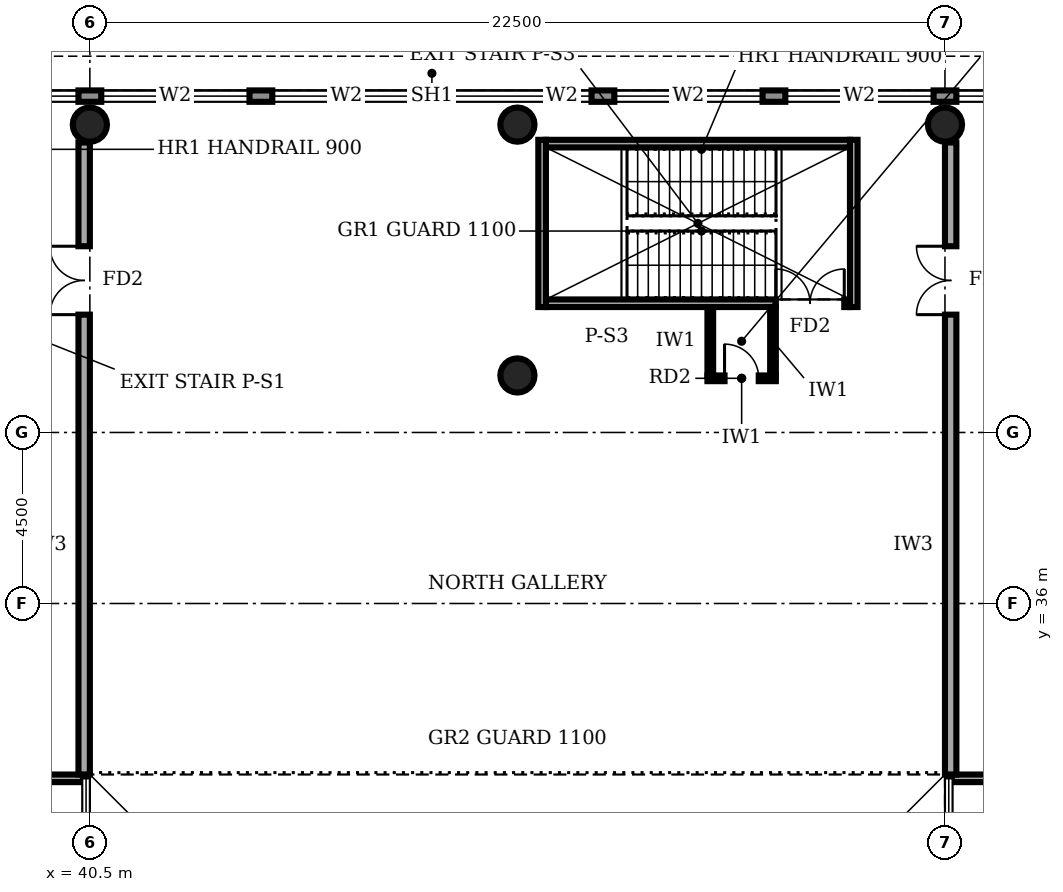
"""IFC4 building model, lengths in metres.
Left out: names, types, materials, properties, quantities, classifications, styles, units other than length and angle.
Written with IfcOpenShell. Run it as: python <this file> out.ifc"""

import sys

from ifc_helpers import new_model, si_unit, direction, frame, frame_2d, origin, origin_2d, place, context, subcontext, project, spatial, rectangle, circle, extrude, element, fill, save


model = new_model("IFC4")
c1 = context("Model", 3, precision=1e-05, world=origin(), true_north=direction((0.0, 1.0)))
c2 = subcontext(c1, "Body", "Model", "MODEL_VIEW")
j1 = project(units=[si_unit("LENGTHUNIT", "METRE"), si_unit("PLANEANGLEUNIT", "RADIAN")], contexts=[c1])
p1 = place(None, origin())
s1 = spatial("IfcSite", under=j1, at=p1, CompositionType="ELEMENT")
p2 = place(p1, origin())
s2 = spatial("IfcBuilding", under=s1, at=p2, CompositionType="ELEMENT")
p3 = place(p2, frame((0.0, 0.0, 6.0)))
s3 = spatial("IfcBuildingStorey", under=s2, at=p3, CompositionType="ELEMENT", Elevation=6.0)
for number, where, z_axis, x_axis in (
    (1, (51.75, 42.0, 0.0), (0.0, 0.0, 1.0), (1.0, 0.0, 0.0)),
    (2, (40.5, 48.6, 0.0), (0.0, 0.0, 1.0), (1.0, 0.0, 0.0)),
    (3, (51.75, 48.6, 0.0), (0.0, 0.0, 1.0), (1.0, 0.0, 0.0)),
    (4, (63.0, 48.6, 0.0), (0.0, 0.0, 1.0), (1.0, 0.0, 0.0)),
):
    element("IfcColumn", number, at=place(p3, frame(where, z_axis=z_axis, x_axis=x_axis)), inside=s3, PredefinedType="COLUMN", context=c2, shape_type="SweptSolid", body=[
        extrude(circle(Radius=0.45, at=origin_2d()), origin(), (0.0, 0.0, 1.0), 5.0),
    ])
p4 = place(p3, frame((98.98, 49.35, 0.0), z_axis=(0.0, 0.0, 1.0), x_axis=(-1.0, 0.0, 0.0)))
e5 = element("IfcWall", 5, at=p4, inside=s3, PredefinedType="STANDARD", context=c2, shape_type="SweptSolid", body=[
    extrude(rectangle(XDim=98.96, YDim=0.3, at=frame_2d((49.48, 0.0))), origin(), (0.0, 0.0, 1.0), 4.7),
])
p5 = place(p4, frame((94.78, 0.0, 0.6)))
e6 = element("IfcOpeningElement", 6, at=p5, cuts=e5, PredefinedType="OPENING", context=c2, shape_type="SweptSolid", body=[
    extrude(rectangle(XDim=3.9, YDim=2.6, at=frame_2d((1.95, 1.3))), frame((0.0, 0.16, 0.0), z_axis=(0.0, -1.0, 0.0), x_axis=(1.0, 0.0, 0.0)), (0.0, 0.0, 1.0), 0.32),
])
p6 = place(p4, frame((90.28, 0.0, 0.6)))
e7 = element("IfcOpeningElement", 7, at=p6, cuts=e5, PredefinedType="OPENING", context=c2, shape_type="SweptSolid", body=[
    extrude(rectangle(XDim=3.9, YDim=2.6, at=frame_2d((1.95, 1.3))), frame((0.0, 0.16, 0.0), z_axis=(0.0, -1.0, 0.0), x_axis=(1.0, 0.0, 0.0)), (0.0, 0.0, 1.0), 0.32),
])
p7 = place(p4, frame((85.78, 0.0, 0.6)))
e8 = element("IfcOpeningElement", 8, at=p7, cuts=e5, PredefinedType="OPENING", context=c2, shape_type="SweptSolid", body=[
    extrude(rectangle(XDim=3.9, YDim=2.6, at=frame_2d((1.95, 1.3))), frame((0.0, 0.16, 0.0), z_axis=(0.0, -1.0, 0.0), x_axis=(1.0, 0.0, 0.0)), (0.0, 0.0, 1.0), 0.32),
])
p8 = place(p4, frame((81.28, 0.0, 0.6)))
e9 = element("IfcOpeningElement", 9, at=p8, cuts=e5, PredefinedType="OPENING", context=c2, shape_type="SweptSolid", body=[
    extrude(rectangle(XDim=3.9, YDim=2.6, at=frame_2d((1.95, 1.3))), frame((0.0, 0.16, 0.0), z_axis=(0.0, -1.0, 0.0), x_axis=(1.0, 0.0, 0.0)), (0.0, 0.0, 1.0), 0.32),
])
p9 = place(p4, frame((76.78, 0.0, 0.6)))
e10 = element("IfcOpeningElement", 10, at=p9, cuts=e5, PredefinedType="OPENING", context=c2, shape_type="SweptSolid", body=[
    extrude(rectangle(XDim=3.9, YDim=2.6, at=frame_2d((1.95, 1.3))), frame((0.0, 0.16, 0.0), z_axis=(0.0, -1.0, 0.0), x_axis=(1.0, 0.0, 0.0)), (0.0, 0.0, 1.0), 0.32),
])
p10 = place(p4, frame((72.28, 0.0, 0.6)))
e11 = element("IfcOpeningElement", 11, at=p10, cuts=e5, PredefinedType="OPENING", context=c2, shape_type="SweptSolid", body=[
    extrude(rectangle(XDim=3.9, YDim=2.6, at=frame_2d((1.95, 1.3))), frame((0.0, 0.16, 0.0), z_axis=(0.0, -1.0, 0.0), x_axis=(1.0, 0.0, 0.0)), (0.0, 0.0, 1.0), 0.32),
])
p11 = place(p4, frame((67.78, 0.0, 0.6)))
e12 = element("IfcOpeningElement", 12, at=p11, cuts=e5, PredefinedType="OPENING", context=c2, shape_type="SweptSolid", body=[
    extrude(rectangle(XDim=3.9, YDim=2.6, at=frame_2d((1.95, 1.3))), frame((0.0, 0.16, 0.0), z_axis=(0.0, -1.0, 0.0), x_axis=(1.0, 0.0, 0.0)), (0.0, 0.0, 1.0), 0.32),
])
p12 = place(p4, frame((63.28, 0.0, 0.6)))
e13 = element("IfcOpeningElement", 13, at=p12, cuts=e5, PredefinedType="OPENING", context=c2, shape_type="SweptSolid", body=[
    extrude(rectangle(XDim=3.9, YDim=2.6, at=frame_2d((1.95, 1.3))), frame((0.0, 0.16, 0.0), z_axis=(0.0, -1.0, 0.0), x_axis=(1.0, 0.0, 0.0)), (0.0, 0.0, 1.0), 0.32),
])
p13 = place(p4, frame((58.78, 0.0, 0.6)))
e14 = element("IfcOpeningElement", 14, at=p13, cuts=e5, PredefinedType="OPENING", context=c2, shape_type="SweptSolid", body=[
    extrude(rectangle(XDim=3.9, YDim=2.6, at=frame_2d((1.95, 1.3))), frame((0.0, 0.16, 0.0), z_axis=(0.0, -1.0, 0.0), x_axis=(1.0, 0.0, 0.0)), (0.0, 0.0, 1.0), 0.32),
])
p14 = place(p4, frame((54.28, 0.0, 0.6)))
e15 = element("IfcOpeningElement", 15, at=p14, cuts=e5, PredefinedType="OPENING", context=c2, shape_type="SweptSolid", body=[
    extrude(rectangle(XDim=3.9, YDim=2.6, at=frame_2d((1.95, 1.3))), frame((0.0, 0.16, 0.0), z_axis=(0.0, -1.0, 0.0), x_axis=(1.0, 0.0, 0.0)), (0.0, 0.0, 1.0), 0.32),
])
p15 = place(p4, frame((49.78, 0.0, 0.6)))
e16 = element("IfcOpeningElement", 16, at=p15, cuts=e5, PredefinedType="OPENING", context=c2, shape_type="SweptSolid", body=[
    extrude(rectangle(XDim=3.9, YDim=2.6, at=frame_2d((1.95, 1.3))), frame((0.0, 0.16, 0.0), z_axis=(0.0, -1.0, 0.0), x_axis=(1.0, 0.0, 0.0)), (0.0, 0.0, 1.0), 0.32),
])
p16 = place(p4, frame((45.28, 0.0, 0.6)))
e17 = element("IfcOpeningElement", 17, at=p16, cuts=e5, PredefinedType="OPENING", context=c2, shape_type="SweptSolid", body=[
    extrude(rectangle(XDim=3.9, YDim=2.6, at=frame_2d((1.95, 1.3))), frame((0.0, 0.16, 0.0), z_axis=(0.0, -1.0, 0.0), x_axis=(1.0, 0.0, 0.0)), (0.0, 0.0, 1.0), 0.32),
])
p17 = place(p4, frame((40.78, 0.0, 0.6)))
e18 = element("IfcOpeningElement", 18, at=p17, cuts=e5, PredefinedType="OPENING", context=c2, shape_type="SweptSolid", body=[
    extrude(rectangle(XDim=3.9, YDim=2.6, at=frame_2d((1.95, 1.3))), frame((0.0, 0.16, 0.0), z_axis=(0.0, -1.0, 0.0), x_axis=(1.0, 0.0, 0.0)), (0.0, 0.0, 1.0), 0.32),
])
p18 = place(p4, frame((36.28, 0.0, 0.6)))
e19 = element("IfcOpeningElement", 19, at=p18, cuts=e5, PredefinedType="OPENING", context=c2, shape_type="SweptSolid", body=[
    extrude(rectangle(XDim=3.9, YDim=2.6, at=frame_2d((1.95, 1.3))), frame((0.0, 0.16, 0.0), z_axis=(0.0, -1.0, 0.0), x_axis=(1.0, 0.0, 0.0)), (0.0, 0.0, 1.0), 0.32),
])
p19 = place(p4, frame((31.78, 0.0, 0.6)))
e20 = element("IfcOpeningElement", 20, at=p19, cuts=e5, PredefinedType="OPENING", context=c2, shape_type="SweptSolid", body=[
    extrude(rectangle(XDim=3.9, YDim=2.6, at=frame_2d((1.95, 1.3))), frame((0.0, 0.16, 0.0), z_axis=(0.0, -1.0, 0.0), x_axis=(1.0, 0.0, 0.0)), (0.0, 0.0, 1.0), 0.32),
])
p20 = place(p4, frame((27.28, 0.0, 0.6)))
e21 = element("IfcOpeningElement", 21, at=p20, cuts=e5, PredefinedType="OPENING", context=c2, shape_type="SweptSolid", body=[
    extrude(rectangle(XDim=3.9, YDim=2.6, at=frame_2d((1.95, 1.3))), frame((0.0, 0.16, 0.0), z_axis=(0.0, -1.0, 0.0), x_axis=(1.0, 0.0, 0.0)), (0.0, 0.0, 1.0), 0.32),
])
p21 = place(p4, frame((22.78, 0.0, 0.6)))
e22 = element("IfcOpeningElement", 22, at=p21, cuts=e5, PredefinedType="OPENING", context=c2, shape_type="SweptSolid", body=[
    extrude(rectangle(XDim=3.9, YDim=2.6, at=frame_2d((1.95, 1.3))), frame((0.0, 0.16, 0.0), z_axis=(0.0, -1.0, 0.0), x_axis=(1.0, 0.0, 0.0)), (0.0, 0.0, 1.0), 0.32),
])
p22 = place(p4, frame((18.28, 0.0, 0.6)))
e23 = element("IfcOpeningElement", 23, at=p22, cuts=e5, PredefinedType="OPENING", context=c2, shape_type="SweptSolid", body=[
    extrude(rectangle(XDim=3.9, YDim=2.6, at=frame_2d((1.95, 1.3))), frame((0.0, 0.16, 0.0), z_axis=(0.0, -1.0, 0.0), x_axis=(1.0, 0.0, 0.0)), (0.0, 0.0, 1.0), 0.32),
])
p23 = place(p4, frame((13.78, 0.0, 0.6)))
e24 = element("IfcOpeningElement", 24, at=p23, cuts=e5, PredefinedType="OPENING", context=c2, shape_type="SweptSolid", body=[
    extrude(rectangle(XDim=3.9, YDim=2.6, at=frame_2d((1.95, 1.3))), frame((0.0, 0.16, 0.0), z_axis=(0.0, -1.0, 0.0), x_axis=(1.0, 0.0, 0.0)), (0.0, 0.0, 1.0), 0.32),
])
p24 = place(p4, frame((9.28, 0.0, 0.6)))
e25 = element("IfcOpeningElement", 25, at=p24, cuts=e5, PredefinedType="OPENING", context=c2, shape_type="SweptSolid", body=[
    extrude(rectangle(XDim=3.9, YDim=2.6, at=frame_2d((1.95, 1.3))), frame((0.0, 0.16, 0.0), z_axis=(0.0, -1.0, 0.0), x_axis=(1.0, 0.0, 0.0)), (0.0, 0.0, 1.0), 0.32),
])
p25 = place(p4, frame((4.78, 0.0, 0.6)))
e26 = element("IfcOpeningElement", 26, at=p25, cuts=e5, PredefinedType="OPENING", context=c2, shape_type="SweptSolid", body=[
    extrude(rectangle(XDim=3.9, YDim=2.6, at=frame_2d((1.95, 1.3))), frame((0.0, 0.16, 0.0), z_axis=(0.0, -1.0, 0.0), x_axis=(1.0, 0.0, 0.0)), (0.0, 0.0, 1.0), 0.32),
])
p26 = place(p3, frame((28.8, 31.4, 0.0), z_axis=(0.0, 0.0, 1.0), x_axis=(1.0, 0.0, 0.0)))
e27 = element("IfcWall", 27, at=p26, inside=s3, PredefinedType="SOLIDWALL", context=c2, shape_type="SweptSolid", body=[
    extrude(rectangle(XDim=11.52, YDim=0.2, at=frame_2d((5.76, 0.0))), origin(), (0.0, 0.0, 1.0), 4.7),
])
p27 = place(p3, frame((63.18, 31.4, 0.0), z_axis=(0.0, 0.0, 1.0), x_axis=(1.0, 0.0, 0.0)))
e28 = element("IfcWall", 28, at=p27, inside=s3, PredefinedType="SOLIDWALL", context=c2, shape_type="SweptSolid", body=[
    extrude(rectangle(XDim=9.27, YDim=0.2, at=frame_2d((4.635, 0.0))), origin(), (0.0, 0.0, 1.0), 4.7),
])
p28 = place(p3, frame((52.5, 43.9, 0.0), z_axis=(0.0, 0.0, 1.0), x_axis=(1.0, 0.0, 0.0)))
e29 = element("IfcWall", 29, at=p28, inside=s3, PredefinedType="SOLIDWALL", context=c2, shape_type="SweptSolid", body=[
    extrude(rectangle(XDim=8.0, YDim=0.2, at=frame_2d((4.0, 0.0))), origin(), (0.0, 0.0, 1.0), 4.7),
])
p29 = place(p28, frame((6.05, 0.0, 0.0)))
e30 = element("IfcOpeningElement", 30, at=p29, cuts=e29, PredefinedType="OPENING", context=c2, shape_type="SweptSolid", body=[
    extrude(rectangle(XDim=1.8, YDim=2.1, at=frame_2d((0.9, 1.05))), frame((0.0, 0.11, 0.0), z_axis=(0.0, -1.0, 0.0), x_axis=(1.0, 0.0, 0.0)), (0.0, 0.0, 1.0), 0.22),
])
p30 = place(p3, frame((52.5, 48.1, 0.0), z_axis=(0.0, 0.0, 1.0), x_axis=(1.0, 0.0, 0.0)))
e31 = element("IfcWall", 31, at=p30, inside=s3, PredefinedType="SOLIDWALL", context=c2, shape_type="SweptSolid", body=[
    extrude(rectangle(XDim=8.0, YDim=0.2, at=frame_2d((4.0, 0.0))), origin(), (0.0, 0.0, 1.0), 4.7),
])
for number, where, z_axis, x_axis in (
    (32, (52.4, 43.8, 0.0), (0.0, 0.0, 1.0), (0.0, 1.0, 0.0)),
    (33, (60.6, 43.8, 0.0), (0.0, 0.0, 1.0), (0.0, 1.0, 0.0)),
):
    element("IfcWall", number, at=place(p3, frame(where, z_axis=z_axis, x_axis=x_axis)), inside=s3, PredefinedType="SOLIDWALL", context=c2, shape_type="SweptSolid", body=[
        extrude(rectangle(XDim=4.4, YDim=0.2, at=frame_2d((2.2, 0.0))), origin(), (0.0, 0.0, 1.0), 4.7),
    ])
p31 = place(p3, frame((40.35, 31.5, 0.0), z_axis=(0.0, 0.0, 1.0), x_axis=(0.0, 1.0, 0.0)))
e34 = element("IfcWall", 34, at=p31, inside=s3, PredefinedType="SOLIDWALL", context=c2, shape_type="SweptSolid", body=[
    extrude(rectangle(XDim=16.63, YDim=0.3, at=frame_2d((8.315, 0.0))), origin(), (0.0, 0.0, 1.0), 4.7),
])
p32 = place(p31, frame((12.1, 0.0, 0.0)))
e35 = element("IfcOpeningElement", 35, at=p32, cuts=e34, PredefinedType="OPENING", context=c2, shape_type="SweptSolid", body=[
    extrude(rectangle(XDim=1.8, YDim=2.1, at=frame_2d((0.9, 1.05))), frame((0.0, 0.16, 0.0), z_axis=(0.0, -1.0, 0.0), x_axis=(1.0, 0.0, 0.0)), (0.0, 0.0, 1.0), 0.32),
])
p33 = place(p3, frame((63.15, 31.5, 0.0), z_axis=(0.0, 0.0, 1.0), x_axis=(0.0, 1.0, 0.0)))
e36 = element("IfcWall", 36, at=p33, inside=s3, PredefinedType="SOLIDWALL", context=c2, shape_type="SweptSolid", body=[
    extrude(rectangle(XDim=16.63, YDim=0.3, at=frame_2d((8.315, 0.0))), origin(), (0.0, 0.0, 1.0), 4.7),
])
p34 = place(p33, frame((12.1, 0.0, 0.0)))
e37 = element("IfcOpeningElement", 37, at=p34, cuts=e36, PredefinedType="OPENING", context=c2, shape_type="SweptSolid", body=[
    extrude(rectangle(XDim=1.8, YDim=2.1, at=frame_2d((0.9, 1.05))), frame((0.0, 0.16, 0.0), z_axis=(0.0, -1.0, 0.0), x_axis=(1.0, 0.0, 0.0)), (0.0, 0.0, 1.0), 0.32),
])
p35 = place(p3, frame((58.475, 42.0, 0.0), z_axis=(0.0, 0.0, 1.0), x_axis=(0.0, 1.0, 0.0)))
e38 = element("IfcWall", 38, at=p35, inside=s3, PredefinedType="PARTITIONING", context=c2, shape_type="SweptSolid", body=[
    extrude(rectangle(XDim=1.8, YDim=0.15, at=frame_2d((0.9, 0.0))), origin(), (0.0, 0.0, 1.0), 4.7),
])
p36 = place(p3, frame((56.75, 41.925, 0.0), z_axis=(0.0, 0.0, 1.0), x_axis=(1.0, 0.0, 0.0)))
e39 = element("IfcWall", 39, at=p36, inside=s3, PredefinedType="PARTITIONING", context=c2, shape_type="SweptSolid", body=[
    extrude(rectangle(XDim=1.8, YDim=0.15, at=frame_2d((0.9, 0.0))), origin(), (0.0, 0.0, 1.0), 4.7),
])
p37 = place(p36, frame((0.45, 0.0, 0.0)))
e40 = element("IfcOpeningElement", 40, at=p37, cuts=e39, PredefinedType="OPENING", context=c2, shape_type="SweptSolid", body=[
    extrude(rectangle(XDim=0.9, YDim=2.1, at=frame_2d((0.45, 1.05))), frame((0.0, 0.085, 0.0), z_axis=(0.0, -1.0, 0.0), x_axis=(1.0, 0.0, 0.0)), (0.0, 0.0, 1.0), 0.17),
])
p38 = place(p3, frame((56.825, 42.0, 0.0), z_axis=(0.0, 0.0, 1.0), x_axis=(0.0, 1.0, 0.0)))
e41 = element("IfcWall", 41, at=p38, inside=s3, PredefinedType="PARTITIONING", context=c2, shape_type="SweptSolid", body=[
    extrude(rectangle(XDim=1.8, YDim=0.15, at=frame_2d((0.9, 0.0))), origin(), (0.0, 0.0, 1.0), 4.7),
])
p39 = place(p13, origin())
e42 = element("IfcWindow", 42, at=p39, inside=s3, PartitioningType="SINGLE_PANEL", PredefinedType="WINDOW", context=c2, shape_type="SweptSolid", body=[
    extrude(rectangle(XDim=3.9, YDim=2.6, at=frame_2d((1.95, 1.3))), frame((0.0, 0.03, 0.0), z_axis=(0.0, -1.0, 0.0), x_axis=(1.0, 0.0, 0.0)), (0.0, 0.0, 1.0), 0.06),
])
fill(e14, e42)
p40 = place(p14, origin())
e43 = element("IfcWindow", 43, at=p40, inside=s3, PartitioningType="SINGLE_PANEL", PredefinedType="WINDOW", context=c2, shape_type="SweptSolid", body=[
    extrude(rectangle(XDim=3.9, YDim=2.6, at=frame_2d((1.95, 1.3))), frame((0.0, 0.03, 0.0), z_axis=(0.0, -1.0, 0.0), x_axis=(1.0, 0.0, 0.0)), (0.0, 0.0, 1.0), 0.06),
])
fill(e15, e43)
p41 = place(p15, origin())
e44 = element("IfcWindow", 44, at=p41, inside=s3, PartitioningType="SINGLE_PANEL", PredefinedType="WINDOW", context=c2, shape_type="SweptSolid", body=[
    extrude(rectangle(XDim=3.9, YDim=2.6, at=frame_2d((1.95, 1.3))), frame((0.0, 0.03, 0.0), z_axis=(0.0, -1.0, 0.0), x_axis=(1.0, 0.0, 0.0)), (0.0, 0.0, 1.0), 0.06),
])
fill(e16, e44)
p42 = place(p16, origin())
e45 = element("IfcWindow", 45, at=p42, inside=s3, PartitioningType="SINGLE_PANEL", PredefinedType="WINDOW", context=c2, shape_type="SweptSolid", body=[
    extrude(rectangle(XDim=3.9, YDim=2.6, at=frame_2d((1.95, 1.3))), frame((0.0, 0.03, 0.0), z_axis=(0.0, -1.0, 0.0), x_axis=(1.0, 0.0, 0.0)), (0.0, 0.0, 1.0), 0.06),
])
fill(e17, e45)
p43 = place(p17, origin())
e46 = element("IfcWindow", 46, at=p43, inside=s3, PartitioningType="SINGLE_PANEL", PredefinedType="WINDOW", context=c2, shape_type="SweptSolid", body=[
    extrude(rectangle(XDim=3.9, YDim=2.6, at=frame_2d((1.95, 1.3))), frame((0.0, 0.03, 0.0), z_axis=(0.0, -1.0, 0.0), x_axis=(1.0, 0.0, 0.0)), (0.0, 0.0, 1.0), 0.06),
])
fill(e18, e46)
p44 = place(p18, origin())
e47 = element("IfcWindow", 47, at=p44, inside=s3, PartitioningType="SINGLE_PANEL", PredefinedType="WINDOW", context=c2, shape_type="SweptSolid", body=[
    extrude(rectangle(XDim=3.9, YDim=2.6, at=frame_2d((1.95, 1.3))), frame((0.0, 0.03, 0.0), z_axis=(0.0, -1.0, 0.0), x_axis=(1.0, 0.0, 0.0)), (0.0, 0.0, 1.0), 0.06),
])
fill(e19, e47)
p45 = place(p19, origin())
e48 = element("IfcWindow", 48, at=p45, inside=s3, PartitioningType="SINGLE_PANEL", PredefinedType="WINDOW", context=c2, shape_type="SweptSolid", body=[
    extrude(rectangle(XDim=3.9, YDim=2.6, at=frame_2d((1.95, 1.3))), frame((0.0, 0.03, 0.0), z_axis=(0.0, -1.0, 0.0), x_axis=(1.0, 0.0, 0.0)), (0.0, 0.0, 1.0), 0.06),
])
fill(e20, e48)
p46 = place(p29, origin())
e49 = element("IfcDoor", 49, at=p46, inside=s3, OperationType="DOUBLE_DOOR_SINGLE_SWING", PredefinedType="DOOR", context=c2, shape_type="SweptSolid", body=[
    extrude(rectangle(XDim=1.8, YDim=2.1, at=frame_2d((0.9, 1.05))), frame((0.0, 0.025, 0.0), z_axis=(0.0, -1.0, 0.0), x_axis=(1.0, 0.0, 0.0)), (0.0, 0.0, 1.0), 0.05),
])
fill(e30, e49)
p47 = place(p32, origin())
e50 = element("IfcDoor", 50, at=p47, inside=s3, OperationType="DOUBLE_DOOR_SINGLE_SWING", PredefinedType="DOOR", context=c2, shape_type="SweptSolid", body=[
    extrude(rectangle(XDim=1.8, YDim=2.1, at=frame_2d((0.9, 1.05))), frame((0.0, 0.025, 0.0), z_axis=(0.0, -1.0, 0.0), x_axis=(1.0, 0.0, 0.0)), (0.0, 0.0, 1.0), 0.05),
])
fill(e35, e50)
p48 = place(p34, origin())
e51 = element("IfcDoor", 51, at=p48, inside=s3, OperationType="DOUBLE_DOOR_SINGLE_SWING", PredefinedType="DOOR", context=c2, shape_type="SweptSolid", body=[
    extrude(rectangle(XDim=1.8, YDim=2.1, at=frame_2d((0.9, 1.05))), frame((0.0, 0.025, 0.0), z_axis=(0.0, -1.0, 0.0), x_axis=(1.0, 0.0, 0.0)), (0.0, 0.0, 1.0), 0.05),
])
fill(e37, e51)
p49 = place(p37, origin())
e52 = element("IfcDoor", 52, at=p49, inside=s3, OperationType="SINGLE_SWING_LEFT", PredefinedType="DOOR", context=c2, shape_type="SweptSolid", body=[
    extrude(rectangle(XDim=0.9, YDim=2.1, at=frame_2d((0.45, 1.05))), frame((0.0, 0.025, 0.0), z_axis=(0.0, -1.0, 0.0), x_axis=(1.0, 0.0, 0.0)), (0.0, 0.0, 1.0), 0.05),
])
fill(e40, e52)
save(model, sys.argv[1])
